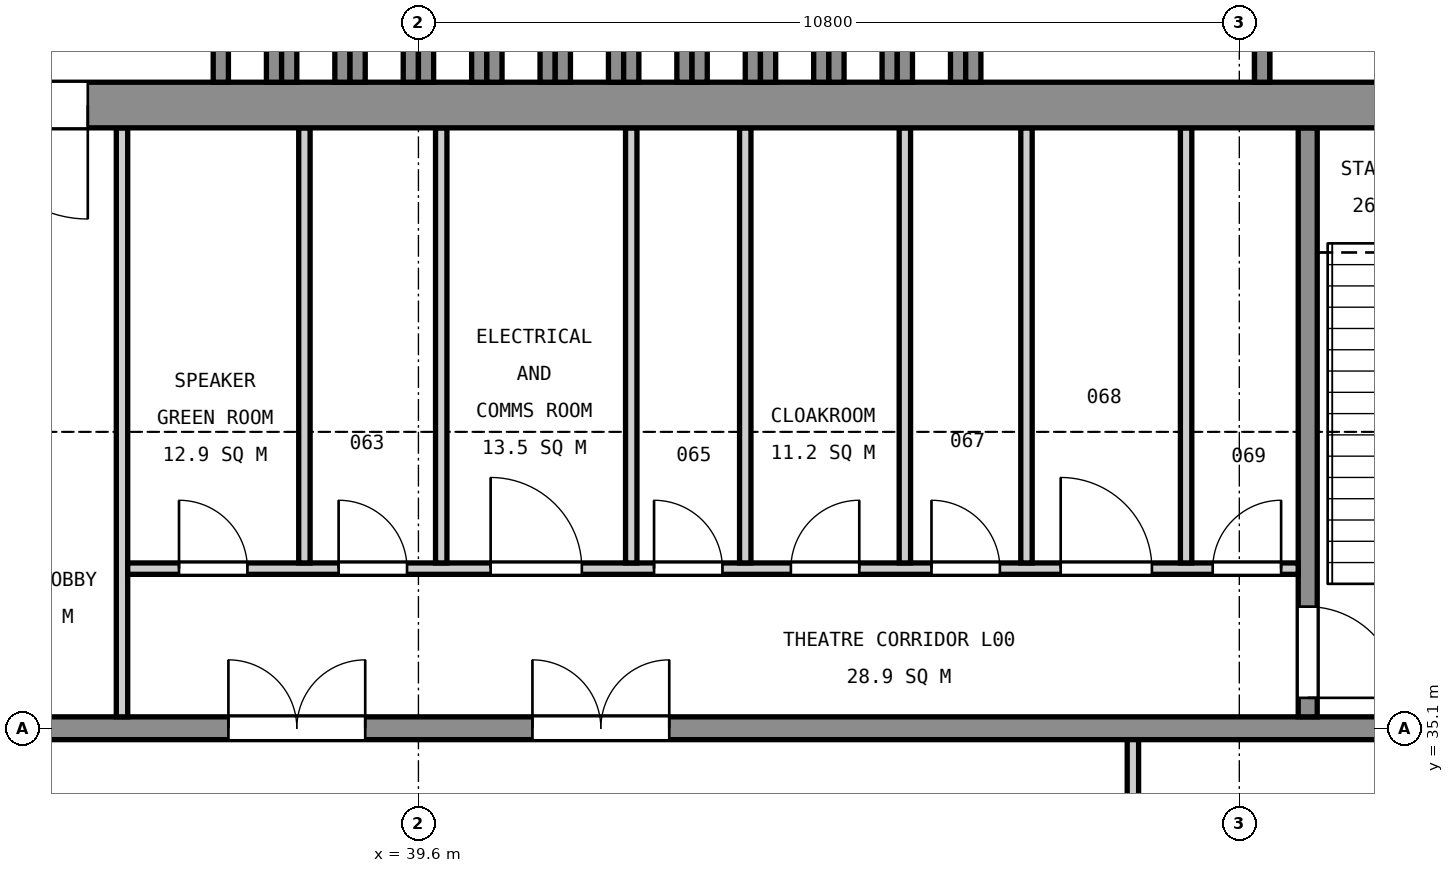
"""IFC4 building model, lengths in metres.
Left out: names, types, materials, properties, quantities, classifications, styles, units other than length and angle.
Written with IfcOpenShell. Run it as: python <this file> out.ifc"""

import sys

from ifc_helpers import new_model, si_unit, direction, frame, frame_2d, origin, place, context, subcontext, project, spatial, rectangle, extrude, element, fill, save


model = new_model("IFC4")
c1 = context("Model", 3, precision=1e-05, world=origin(), true_north=direction((0.0, 1.0)))
c2 = subcontext(c1, "Body", "Model", "MODEL_VIEW")
j1 = project(units=[si_unit("LENGTHUNIT", "METRE"), si_unit("PLANEANGLEUNIT", "RADIAN")], contexts=[c1])
p1 = place(None, origin())
s1 = spatial("IfcSite", under=j1, at=p1, CompositionType="ELEMENT")
p2 = place(p1, origin())
s2 = spatial("IfcBuilding", under=s1, at=p2, CompositionType="ELEMENT")
p3 = place(p2, origin())
s3 = spatial("IfcBuildingStorey", under=s2, at=p3, CompositionType="ELEMENT", Elevation=0.0)
p4 = place(p3, frame((28.1, 35.1, 0.0), z_axis=(0.0, 0.0, 1.0), x_axis=(1.0, 0.0, 0.0)))
e1 = element("IfcWall", 1, at=p4, inside=s3, PredefinedType="SOLIDWALL", context=c2, shape_type="SweptSolid", body=[
    extrude(rectangle(XDim=26.8, YDim=0.3, at=frame_2d((13.4, 0.0))), origin(), (0.0, 0.0, 1.0), 5.7),
])
p5 = place(p4, frame((4.7, 0.0, 0.0)))
e2 = element("IfcOpeningElement", 2, at=p5, cuts=e1, PredefinedType="OPENING", context=c2, shape_type="SweptSolid", body=[
    extrude(rectangle(XDim=1.8, YDim=2.4, at=frame_2d((0.9, 1.2))), frame((0.0, 0.16, 0.0), z_axis=(0.0, -1.0, 0.0), x_axis=(1.0, 0.0, 0.0)), (0.0, 0.0, 1.0), 0.32),
])
p6 = place(p4, frame((9.0, 0.0, 0.0)))
e3 = element("IfcOpeningElement", 3, at=p6, cuts=e1, PredefinedType="OPENING", context=c2, shape_type="SweptSolid", body=[
    extrude(rectangle(XDim=1.8, YDim=2.4, at=frame_2d((0.9, 1.2))), frame((0.0, 0.16, 0.0), z_axis=(0.0, -1.0, 0.0), x_axis=(1.0, 0.0, 0.0)), (0.0, 0.0, 1.0), 0.32),
])
p7 = place(p4, frame((13.0, 0.0, 0.0)))
e4 = element("IfcOpeningElement", 4, at=p7, cuts=e1, PredefinedType="OPENING", context=c2, shape_type="SweptSolid", body=[
    extrude(rectangle(XDim=1.8, YDim=2.4, at=frame_2d((0.9, 1.2))), frame((0.0, 0.16, 0.0), z_axis=(0.0, -1.0, 0.0), x_axis=(1.0, 0.0, 0.0)), (0.0, 0.0, 1.0), 0.32),
])
p8 = place(p3, frame((51.3, 35.25, 0.0), z_axis=(0.0, 0.0, 1.0), x_axis=(0.0, 1.0, 0.0)))
e5 = element("IfcWall", 5, at=p8, inside=s3, PredefinedType="SOLIDWALL", context=c2, shape_type="SweptSolid", body=[
    extrude(rectangle(XDim=7.75, YDim=0.25, at=frame_2d((3.875, 0.0))), origin(), (0.0, 0.0, 1.0), 5.7),
])
p9 = place(p8, frame((0.25, 0.0, 0.0)))
e6 = element("IfcOpeningElement", 6, at=p9, cuts=e5, PredefinedType="OPENING", context=c2, shape_type="SweptSolid", body=[
    extrude(rectangle(XDim=1.2, YDim=2.1, at=frame_2d((0.6, 1.05))), frame((0.0, 0.135, 0.0), z_axis=(0.0, -1.0, 0.0), x_axis=(1.0, 0.0, 0.0)), (0.0, 0.0, 1.0), 0.27),
])
p10 = place(p3, frame((35.7, 35.25, 0.0), z_axis=(0.0, 0.0, 1.0), x_axis=(0.0, 1.0, 0.0)))
e7 = element("IfcWall", 7, at=p10, inside=s3, PredefinedType="SOLIDWALL", context=c2, shape_type="SweptSolid", body=[
    extrude(rectangle(XDim=7.75, YDim=0.15, at=frame_2d((3.875, 0.0))), origin(), (0.0, 0.0, 1.0), 5.7),
])
p11 = place(p3, frame((35.775, 37.2, 0.0), z_axis=(0.0, 0.0, 1.0), x_axis=(1.0, 0.0, 0.0)))
e8 = element("IfcWall", 8, at=p11, inside=s3, PredefinedType="SOLIDWALL", context=c2, shape_type="SweptSolid", body=[
    extrude(rectangle(XDim=15.4, YDim=0.15, at=frame_2d((7.7, 0.0))), origin(), (0.0, 0.0, 1.0), 5.7),
])
p12 = place(p11, frame((0.675, 0.0, 0.0)))
e9 = element("IfcOpeningElement", 9, at=p12, cuts=e8, PredefinedType="OPENING", context=c2, shape_type="SweptSolid", body=[
    extrude(rectangle(XDim=0.9, YDim=2.1, at=frame_2d((0.45, 1.05))), frame((0.0, 0.085, 0.0), z_axis=(0.0, -1.0, 0.0), x_axis=(1.0, 0.0, 0.0)), (0.0, 0.0, 1.0), 0.17),
])
p13 = place(p11, frame((2.775, 0.0, 0.0)))
e10 = element("IfcOpeningElement", 10, at=p13, cuts=e8, PredefinedType="OPENING", context=c2, shape_type="SweptSolid", body=[
    extrude(rectangle(XDim=0.9, YDim=2.1, at=frame_2d((0.45, 1.05))), frame((0.0, 0.085, 0.0), z_axis=(0.0, -1.0, 0.0), x_axis=(1.0, 0.0, 0.0)), (0.0, 0.0, 1.0), 0.17),
])
p14 = place(p11, frame((4.775, 0.0, 0.0)))
e11 = element("IfcOpeningElement", 11, at=p14, cuts=e8, PredefinedType="OPENING", context=c2, shape_type="SweptSolid", body=[
    extrude(rectangle(XDim=1.2, YDim=2.1, at=frame_2d((0.6, 1.05))), frame((0.0, 0.085, 0.0), z_axis=(0.0, -1.0, 0.0), x_axis=(1.0, 0.0, 0.0)), (0.0, 0.0, 1.0), 0.17),
])
p15 = place(p11, frame((6.925, 0.0, 0.0)))
e12 = element("IfcOpeningElement", 12, at=p15, cuts=e8, PredefinedType="OPENING", context=c2, shape_type="SweptSolid", body=[
    extrude(rectangle(XDim=0.9, YDim=2.1, at=frame_2d((0.45, 1.05))), frame((0.0, 0.085, 0.0), z_axis=(0.0, -1.0, 0.0), x_axis=(1.0, 0.0, 0.0)), (0.0, 0.0, 1.0), 0.17),
])
p16 = place(p11, frame((8.725, 0.0, 0.0)))
e13 = element("IfcOpeningElement", 13, at=p16, cuts=e8, PredefinedType="OPENING", context=c2, shape_type="SweptSolid", body=[
    extrude(rectangle(XDim=0.9, YDim=2.1, at=frame_2d((0.45, 1.05))), frame((0.0, 0.085, 0.0), z_axis=(0.0, -1.0, 0.0), x_axis=(1.0, 0.0, 0.0)), (0.0, 0.0, 1.0), 0.17),
])
p17 = place(p11, frame((10.575, 0.0, 0.0)))
e14 = element("IfcOpeningElement", 14, at=p17, cuts=e8, PredefinedType="OPENING", context=c2, shape_type="SweptSolid", body=[
    extrude(rectangle(XDim=0.9, YDim=2.1, at=frame_2d((0.45, 1.05))), frame((0.0, 0.085, 0.0), z_axis=(0.0, -1.0, 0.0), x_axis=(1.0, 0.0, 0.0)), (0.0, 0.0, 1.0), 0.17),
])
p18 = place(p11, frame((12.275, 0.0, 0.0)))
e15 = element("IfcOpeningElement", 15, at=p18, cuts=e8, PredefinedType="OPENING", context=c2, shape_type="SweptSolid", body=[
    extrude(rectangle(XDim=1.2, YDim=2.1, at=frame_2d((0.6, 1.05))), frame((0.0, 0.085, 0.0), z_axis=(0.0, -1.0, 0.0), x_axis=(1.0, 0.0, 0.0)), (0.0, 0.0, 1.0), 0.17),
])
p19 = place(p11, frame((14.275, 0.0, 0.0)))
e16 = element("IfcOpeningElement", 16, at=p19, cuts=e8, PredefinedType="OPENING", context=c2, shape_type="SweptSolid", body=[
    extrude(rectangle(XDim=0.9, YDim=2.1, at=frame_2d((0.45, 1.05))), frame((0.0, 0.085, 0.0), z_axis=(0.0, -1.0, 0.0), x_axis=(1.0, 0.0, 0.0)), (0.0, 0.0, 1.0), 0.17),
])
for number, where, z_axis, x_axis in (
    (17, (38.1, 37.275, 0.0), (0.0, 0.0, 1.0), (0.0, 1.0, 0.0)),
    (18, (39.9, 37.275, 0.0), (0.0, 0.0, 1.0), (0.0, 1.0, 0.0)),
    (19, (42.4, 37.275, 0.0), (0.0, 0.0, 1.0), (0.0, 1.0, 0.0)),
    (20, (43.9, 37.275, 0.0), (0.0, 0.0, 1.0), (0.0, 1.0, 0.0)),
    (21, (46.0, 37.275, 0.0), (0.0, 0.0, 1.0), (0.0, 1.0, 0.0)),
    (22, (47.6, 37.275, 0.0), (0.0, 0.0, 1.0), (0.0, 1.0, 0.0)),
    (23, (49.7, 37.275, 0.0), (0.0, 0.0, 1.0), (0.0, 1.0, 0.0)),
):
    element("IfcWall", number, at=place(p3, frame(where, z_axis=z_axis, x_axis=x_axis)), inside=s3, PredefinedType="SOLIDWALL", context=c2, shape_type="SweptSolid", body=[
        extrude(rectangle(XDim=5.725, YDim=0.15, at=frame_2d((2.863, 0.0))), origin(), (0.0, 0.0, 1.0), 5.7),
    ])
p20 = place(p3, frame((27.8, 43.3, 0.0), z_axis=(0.0, 0.0, 1.0), x_axis=(1.0, 0.0, 0.0)))
e24 = element("IfcWall", 24, at=p20, inside=s3, PredefinedType="SOLIDWALL", context=c2, shape_type="SweptSolid", body=[
    extrude(rectangle(XDim=27.4, YDim=0.6, at=frame_2d((13.7, 0.0))), origin(), (0.0, 0.0, 1.0), 6.0),
])
p21 = place(p20, frame((4.25, 0.0, 0.0)))
e25 = element("IfcOpeningElement", 25, at=p21, cuts=e24, PredefinedType="OPENING", context=c2, shape_type="SweptSolid", body=[
    extrude(rectangle(XDim=1.5, YDim=2.4, at=frame_2d((0.75, 1.2))), frame((0.0, 0.31, 0.0), z_axis=(0.0, -1.0, 0.0), x_axis=(1.0, 0.0, 0.0)), (0.0, 0.0, 1.0), 0.62),
])
p22 = place(p20, frame((5.95, 0.0, 0.0)))
e26 = element("IfcOpeningElement", 26, at=p22, cuts=e24, PredefinedType="OPENING", context=c2, shape_type="SweptSolid", body=[
    extrude(rectangle(XDim=1.5, YDim=2.4, at=frame_2d((0.75, 1.2))), frame((0.0, 0.31, 0.0), z_axis=(0.0, -1.0, 0.0), x_axis=(1.0, 0.0, 0.0)), (0.0, 0.0, 1.0), 0.62),
])
for number, where, z_axis, x_axis in (
    (27, (37.0, 43.6, 0.0), (0.0, 0.0, 1.0), (0.0, 1.0, 0.0)),
    (28, (37.7, 43.6, 0.0), (0.0, 0.0, 1.0), (0.0, 1.0, 0.0)),
):
    element("IfcWall", number, at=place(p3, frame(where, z_axis=z_axis, x_axis=x_axis)), inside=s3, PredefinedType="SOLIDWALL", context=c2, shape_type="SweptSolid", body=[
        extrude(rectangle(XDim=21.8, YDim=0.2, at=frame_2d((10.9, 0.0))), origin(), (0.0, 0.0, 1.0), 0.2),
    ])
for number, where, z_axis, x_axis in (
    (29, (37.9, 43.6, 0.0), (0.0, 0.0, 1.0), (0.0, 1.0, 0.0)),
    (30, (38.6, 43.6, 0.0), (0.0, 0.0, 1.0), (0.0, 1.0, 0.0)),
):
    element("IfcWall", number, at=place(p3, frame(where, z_axis=z_axis, x_axis=x_axis)), inside=s3, PredefinedType="SOLIDWALL", context=c2, shape_type="SweptSolid", body=[
        extrude(rectangle(XDim=21.8, YDim=0.2, at=frame_2d((10.9, 0.0))), origin(), (0.0, 0.0, 1.0), 0.4),
    ])
for number, where, z_axis, x_axis in (
    (31, (38.8, 43.6, 0.0), (0.0, 0.0, 1.0), (0.0, 1.0, 0.0)),
    (32, (39.5, 43.6, 0.0), (0.0, 0.0, 1.0), (0.0, 1.0, 0.0)),
):
    element("IfcWall", number, at=place(p3, frame(where, z_axis=z_axis, x_axis=x_axis)), inside=s3, PredefinedType="SOLIDWALL", context=c2, shape_type="SweptSolid", body=[
        extrude(rectangle(XDim=21.8, YDim=0.2, at=frame_2d((10.9, 0.0))), origin(), (0.0, 0.0, 1.0), 0.6),
    ])
for number, where, z_axis, x_axis in (
    (33, (39.7, 43.6, 0.0), (0.0, 0.0, 1.0), (0.0, 1.0, 0.0)),
    (34, (40.4, 43.6, 0.0), (0.0, 0.0, 1.0), (0.0, 1.0, 0.0)),
):
    element("IfcWall", number, at=place(p3, frame(where, z_axis=z_axis, x_axis=x_axis)), inside=s3, PredefinedType="SOLIDWALL", context=c2, shape_type="SweptSolid", body=[
        extrude(rectangle(XDim=21.8, YDim=0.2, at=frame_2d((10.9, 0.0))), origin(), (0.0, 0.0, 1.0), 0.8),
    ])
for number, where, z_axis, x_axis in (
    (35, (40.6, 43.6, 0.0), (0.0, 0.0, 1.0), (0.0, 1.0, 0.0)),
    (36, (41.3, 43.6, 0.0), (0.0, 0.0, 1.0), (0.0, 1.0, 0.0)),
):
    element("IfcWall", number, at=place(p3, frame(where, z_axis=z_axis, x_axis=x_axis)), inside=s3, PredefinedType="SOLIDWALL", context=c2, shape_type="SweptSolid", body=[
        extrude(rectangle(XDim=21.8, YDim=0.2, at=frame_2d((10.9, 0.0))), origin(), (0.0, 0.0, 1.0), 1.0),
    ])
for number, where, z_axis, x_axis in (
    (37, (41.5, 43.6, 0.0), (0.0, 0.0, 1.0), (0.0, 1.0, 0.0)),
    (38, (42.2, 43.6, 0.0), (0.0, 0.0, 1.0), (0.0, 1.0, 0.0)),
):
    element("IfcWall", number, at=place(p3, frame(where, z_axis=z_axis, x_axis=x_axis)), inside=s3, PredefinedType="SOLIDWALL", context=c2, shape_type="SweptSolid", body=[
        extrude(rectangle(XDim=21.8, YDim=0.2, at=frame_2d((10.9, 0.0))), origin(), (0.0, 0.0, 1.0), 1.2),
    ])
for number, where, z_axis, x_axis in (
    (39, (42.4, 43.6, 0.0), (0.0, 0.0, 1.0), (0.0, 1.0, 0.0)),
    (40, (43.1, 43.6, 0.0), (0.0, 0.0, 1.0), (0.0, 1.0, 0.0)),
):
    element("IfcWall", number, at=place(p3, frame(where, z_axis=z_axis, x_axis=x_axis)), inside=s3, PredefinedType="SOLIDWALL", context=c2, shape_type="SweptSolid", body=[
        extrude(rectangle(XDim=21.8, YDim=0.2, at=frame_2d((10.9, 0.0))), origin(), (0.0, 0.0, 1.0), 1.4),
    ])
for number, where, z_axis, x_axis in (
    (41, (43.3, 43.6, 0.0), (0.0, 0.0, 1.0), (0.0, 1.0, 0.0)),
    (42, (44.0, 43.6, 0.0), (0.0, 0.0, 1.0), (0.0, 1.0, 0.0)),
):
    element("IfcWall", number, at=place(p3, frame(where, z_axis=z_axis, x_axis=x_axis)), inside=s3, PredefinedType="SOLIDWALL", context=c2, shape_type="SweptSolid", body=[
        extrude(rectangle(XDim=21.8, YDim=0.2, at=frame_2d((10.9, 0.0))), origin(), (0.0, 0.0, 1.0), 1.6),
    ])
for number, where, z_axis, x_axis in (
    (43, (44.2, 43.6, 0.0), (0.0, 0.0, 1.0), (0.0, 1.0, 0.0)),
    (44, (44.9, 43.6, 0.0), (0.0, 0.0, 1.0), (0.0, 1.0, 0.0)),
):
    element("IfcWall", number, at=place(p3, frame(where, z_axis=z_axis, x_axis=x_axis)), inside=s3, PredefinedType="SOLIDWALL", context=c2, shape_type="SweptSolid", body=[
        extrude(rectangle(XDim=21.8, YDim=0.2, at=frame_2d((10.9, 0.0))), origin(), (0.0, 0.0, 1.0), 1.8),
    ])
for number, where, z_axis, x_axis in (
    (45, (45.1, 43.6, 0.0), (0.0, 0.0, 1.0), (0.0, 1.0, 0.0)),
    (46, (45.8, 43.6, 0.0), (0.0, 0.0, 1.0), (0.0, 1.0, 0.0)),
):
    element("IfcWall", number, at=place(p3, frame(where, z_axis=z_axis, x_axis=x_axis)), inside=s3, PredefinedType="SOLIDWALL", context=c2, shape_type="SweptSolid", body=[
        extrude(rectangle(XDim=21.8, YDim=0.2, at=frame_2d((10.9, 0.0))), origin(), (0.0, 0.0, 1.0), 2.0),
    ])
for number, where, z_axis, x_axis in (
    (47, (46.0, 43.6, 0.0), (0.0, 0.0, 1.0), (0.0, 1.0, 0.0)),
    (48, (46.7, 43.6, 0.0), (0.0, 0.0, 1.0), (0.0, 1.0, 0.0)),
    (49, (46.9, 43.6, 0.0), (0.0, 0.0, 1.0), (0.0, 1.0, 0.0)),
):
    element("IfcWall", number, at=place(p3, frame(where, z_axis=z_axis, x_axis=x_axis)), inside=s3, PredefinedType="SOLIDWALL", context=c2, shape_type="SweptSolid", body=[
        extrude(rectangle(XDim=21.8, YDim=0.2, at=frame_2d((10.9, 0.0))), origin(), (0.0, 0.0, 1.0), 2.2),
    ])
p23 = place(p3, frame((50.7, 43.6, 0.0), z_axis=(0.0, 0.0, 1.0), x_axis=(0.0, 1.0, 0.0)))
e50 = element("IfcWall", 50, at=p23, inside=s3, PredefinedType="SOLIDWALL", context=c2, shape_type="SweptSolid", body=[
    extrude(rectangle(XDim=19.775, YDim=0.2, at=frame_2d((9.887, 0.0))), origin(), (0.0, 0.0, 1.0), 2.2),
])
p24 = place(p3, frame((50.7, 43.6, 2.4), z_axis=(0.0, 0.0, 1.0), x_axis=(0.0, 1.0, 0.0)))
e51 = element("IfcWall", 51, at=p24, inside=s3, PredefinedType="SOLIDWALL", context=c2, shape_type="SweptSolid", body=[
    extrude(rectangle(XDim=4.125, YDim=0.2, at=frame_2d((2.062, 0.0))), origin(), (0.0, 0.0, 1.0), 2.5),
])
p25 = place(p24, frame((1.35, 0.0, 0.0)))
e52 = element("IfcOpeningElement", 52, at=p25, cuts=e51, PredefinedType="OPENING", context=c2, shape_type="SweptSolid", body=[
    extrude(rectangle(XDim=0.9, YDim=2.1, at=frame_2d((0.45, 1.05))), frame((0.0, 0.11, 0.0), z_axis=(0.0, -1.0, 0.0), x_axis=(1.0, 0.0, 0.0)), (0.0, 0.0, 1.0), 0.22),
])
p26 = place(p3, frame((49.0, 29.925, 0.0), z_axis=(0.0, 0.0, 1.0), x_axis=(0.0, 1.0, 0.0)))
e53 = element("IfcWall", 53, at=p26, inside=s3, PredefinedType="SOLIDWALL", context=c2, shape_type="SweptSolid", body=[
    extrude(rectangle(XDim=5.025, YDim=0.15, at=frame_2d((2.512, 0.0))), origin(), (0.0, 0.0, 1.0), 4.4),
])
p27 = place(p26, frame((0.825, 0.0, 0.0)))
e54 = element("IfcOpeningElement", 54, at=p27, cuts=e53, PredefinedType="OPENING", context=c2, shape_type="SweptSolid", body=[
    extrude(rectangle(XDim=0.9, YDim=2.1, at=frame_2d((0.45, 1.05))), frame((0.0, 0.085, 0.0), z_axis=(0.0, -1.0, 0.0), x_axis=(1.0, 0.0, 0.0)), (0.0, 0.0, 1.0), 0.17),
])
p28 = place(p9, frame((1.2, 0.0, 0.0), z_axis=(0.0, 0.0, 1.0), x_axis=(-1.0, 0.0, 0.0)))
e55 = element("IfcDoor", 55, at=p28, inside=s3, OperationType="SINGLE_SWING_RIGHT", PredefinedType="DOOR", context=c2, shape_type="SweptSolid", body=[
    extrude(rectangle(XDim=1.2, YDim=2.1, at=frame_2d((0.6, 1.05))), frame((0.0, 0.025, 0.0), z_axis=(0.0, -1.0, 0.0), x_axis=(1.0, 0.0, 0.0)), (0.0, 0.0, 1.0), 0.05),
])
fill(e6, e55)
p29 = place(p6, origin())
e56 = element("IfcDoor", 56, at=p29, inside=s3, OperationType="DOUBLE_DOOR_SINGLE_SWING", PredefinedType="DOOR", context=c2, shape_type="SweptSolid", body=[
    extrude(rectangle(XDim=1.8, YDim=2.4, at=frame_2d((0.9, 1.2))), frame((0.0, 0.025, 0.0), z_axis=(0.0, -1.0, 0.0), x_axis=(1.0, 0.0, 0.0)), (0.0, 0.0, 1.0), 0.05),
])
fill(e3, e56)
p30 = place(p7, origin())
e57 = element("IfcDoor", 57, at=p30, inside=s3, OperationType="DOUBLE_DOOR_SINGLE_SWING", PredefinedType="DOOR", context=c2, shape_type="SweptSolid", body=[
    extrude(rectangle(XDim=1.8, YDim=2.4, at=frame_2d((0.9, 1.2))), frame((0.0, 0.025, 0.0), z_axis=(0.0, -1.0, 0.0), x_axis=(1.0, 0.0, 0.0)), (0.0, 0.0, 1.0), 0.05),
])
fill(e4, e57)
p31 = place(p22, frame((1.5, 0.0, 0.0), z_axis=(0.0, 0.0, 1.0), x_axis=(-1.0, 0.0, 0.0)))
e58 = element("IfcDoor", 58, at=p31, inside=s3, OperationType="SINGLE_SWING_LEFT", PredefinedType="DOOR", context=c2, shape_type="SweptSolid", body=[
    extrude(rectangle(XDim=1.5, YDim=2.4, at=frame_2d((0.75, 1.2))), frame((0.0, 0.025, 0.0), z_axis=(0.0, -1.0, 0.0), x_axis=(1.0, 0.0, 0.0)), (0.0, 0.0, 1.0), 0.05),
])
fill(e26, e58)
p32 = place(p12, origin())
e59 = element("IfcDoor", 59, at=p32, inside=s3, OperationType="SINGLE_SWING_LEFT", PredefinedType="DOOR", context=c2, shape_type="SweptSolid", body=[
    extrude(rectangle(XDim=0.9, YDim=2.1, at=frame_2d((0.45, 1.05))), frame((0.0, 0.025, 0.0), z_axis=(0.0, -1.0, 0.0), x_axis=(1.0, 0.0, 0.0)), (0.0, 0.0, 1.0), 0.05),
])
fill(e9, e59)
p33 = place(p13, origin())
e60 = element("IfcDoor", 60, at=p33, inside=s3, OperationType="SINGLE_SWING_LEFT", PredefinedType="DOOR", context=c2, shape_type="SweptSolid", body=[
    extrude(rectangle(XDim=0.9, YDim=2.1, at=frame_2d((0.45, 1.05))), frame((0.0, 0.025, 0.0), z_axis=(0.0, -1.0, 0.0), x_axis=(1.0, 0.0, 0.0)), (0.0, 0.0, 1.0), 0.05),
])
fill(e10, e60)
p34 = place(p14, origin())
e61 = element("IfcDoor", 61, at=p34, inside=s3, OperationType="SINGLE_SWING_LEFT", PredefinedType="DOOR", context=c2, shape_type="SweptSolid", body=[
    extrude(rectangle(XDim=1.2, YDim=2.1, at=frame_2d((0.6, 1.05))), frame((0.0, 0.025, 0.0), z_axis=(0.0, -1.0, 0.0), x_axis=(1.0, 0.0, 0.0)), (0.0, 0.0, 1.0), 0.05),
])
fill(e11, e61)
p35 = place(p15, origin())
e62 = element("IfcDoor", 62, at=p35, inside=s3, OperationType="SINGLE_SWING_LEFT", PredefinedType="DOOR", context=c2, shape_type="SweptSolid", body=[
    extrude(rectangle(XDim=0.9, YDim=2.1, at=frame_2d((0.45, 1.05))), frame((0.0, 0.025, 0.0), z_axis=(0.0, -1.0, 0.0), x_axis=(1.0, 0.0, 0.0)), (0.0, 0.0, 1.0), 0.05),
])
fill(e12, e62)
p36 = place(p16, origin())
e63 = element("IfcDoor", 63, at=p36, inside=s3, OperationType="SINGLE_SWING_RIGHT", PredefinedType="DOOR", context=c2, shape_type="SweptSolid", body=[
    extrude(rectangle(XDim=0.9, YDim=2.1, at=frame_2d((0.45, 1.05))), frame((0.0, 0.025, 0.0), z_axis=(0.0, -1.0, 0.0), x_axis=(1.0, 0.0, 0.0)), (0.0, 0.0, 1.0), 0.05),
])
fill(e13, e63)
p37 = place(p17, origin())
e64 = element("IfcDoor", 64, at=p37, inside=s3, OperationType="SINGLE_SWING_LEFT", PredefinedType="DOOR", context=c2, shape_type="SweptSolid", body=[
    extrude(rectangle(XDim=0.9, YDim=2.1, at=frame_2d((0.45, 1.05))), frame((0.0, 0.025, 0.0), z_axis=(0.0, -1.0, 0.0), x_axis=(1.0, 0.0, 0.0)), (0.0, 0.0, 1.0), 0.05),
])
fill(e14, e64)
p38 = place(p18, origin())
e65 = element("IfcDoor", 65, at=p38, inside=s3, OperationType="SINGLE_SWING_LEFT", PredefinedType="DOOR", context=c2, shape_type="SweptSolid", body=[
    extrude(rectangle(XDim=1.2, YDim=2.1, at=frame_2d((0.6, 1.05))), frame((0.0, 0.025, 0.0), z_axis=(0.0, -1.0, 0.0), x_axis=(1.0, 0.0, 0.0)), (0.0, 0.0, 1.0), 0.05),
])
fill(e15, e65)
p39 = place(p19, origin())
e66 = element("IfcDoor", 66, at=p39, inside=s3, OperationType="SINGLE_SWING_RIGHT", PredefinedType="DOOR", context=c2, shape_type="SweptSolid", body=[
    extrude(rectangle(XDim=0.9, YDim=2.1, at=frame_2d((0.45, 1.05))), frame((0.0, 0.025, 0.0), z_axis=(0.0, -1.0, 0.0), x_axis=(1.0, 0.0, 0.0)), (0.0, 0.0, 1.0), 0.05),
])
fill(e16, e66)
save(model, sys.argv[1])
